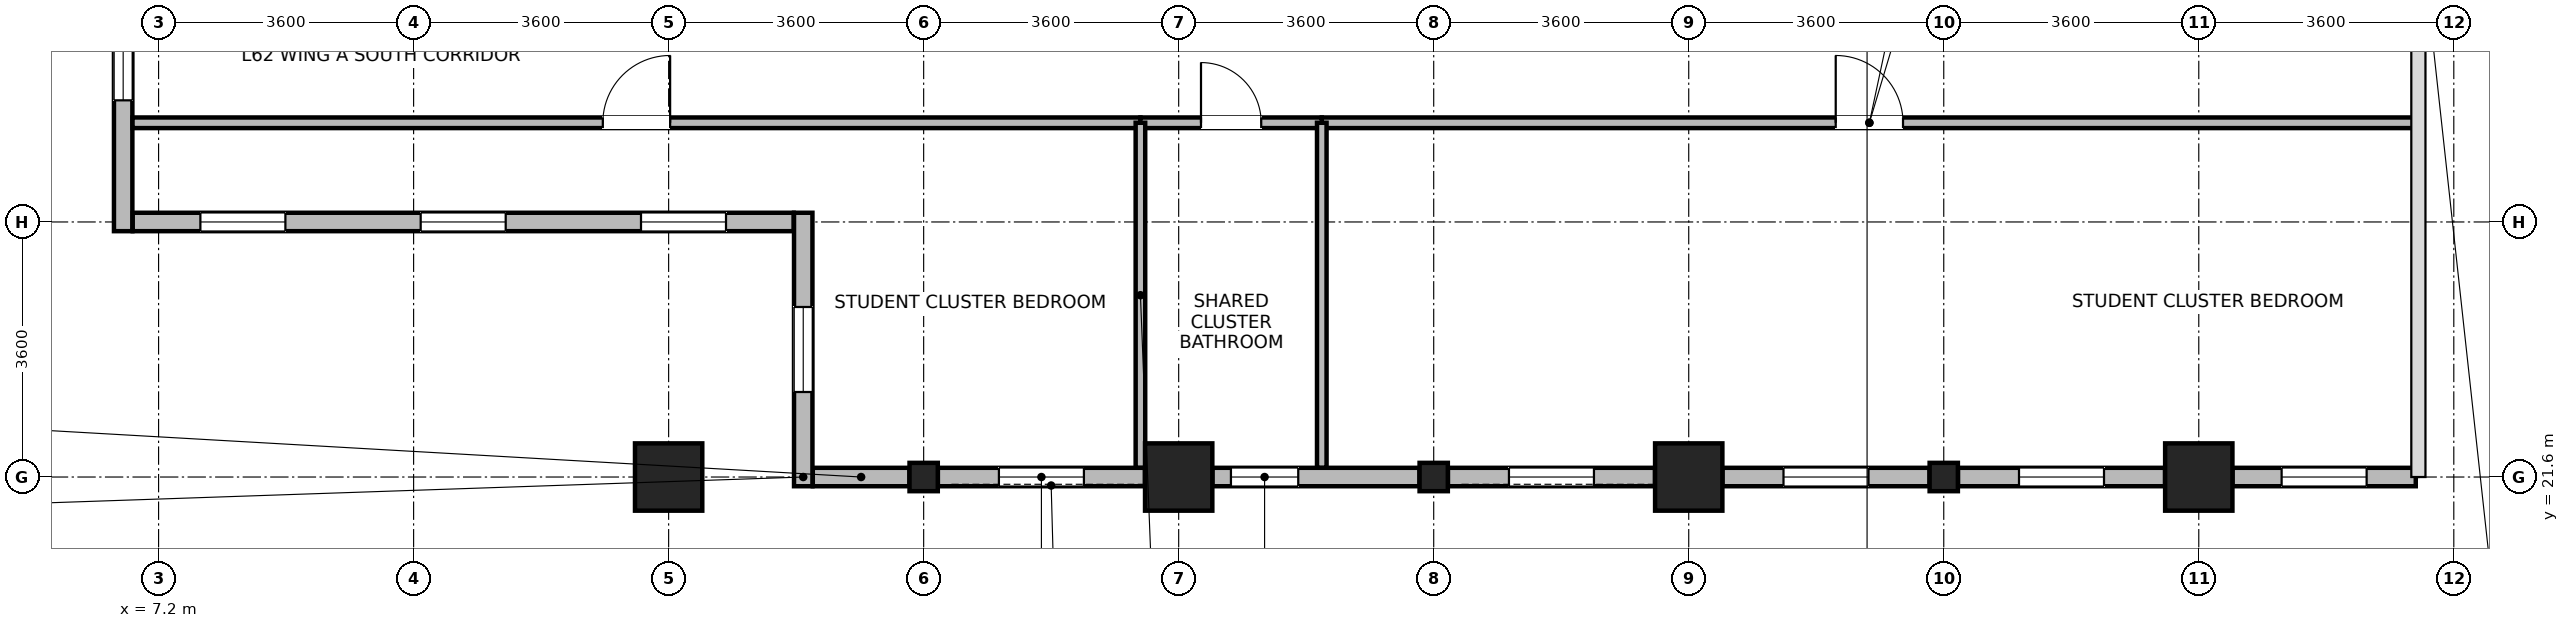
"""IFC4 building model, lengths in metres.
Left out: names, types, materials, properties, quantities, classifications, styles, units other than length and angle.
Written with IfcOpenShell. Run it as: python <this file> out.ifc"""

import sys

from ifc_helpers import new_model, si_unit, direction, frame, frame_2d, origin, origin_2d, place, context, subcontext, project, spatial, rectangle, i_section, extrude, source, transform, mapped, element, fill, save


model = new_model("IFC4")
c1 = context("Model", 3, precision=1e-05, world=origin(), true_north=direction((0.0, 1.0)))
c2 = subcontext(c1, "Body", "Model", "MODEL_VIEW")
j1 = project(units=[si_unit("LENGTHUNIT", "METRE"), si_unit("PLANEANGLEUNIT", "RADIAN")], contexts=[c1])
p1 = place(None, origin())
s1 = spatial("IfcSite", under=j1, at=p1, CompositionType="ELEMENT")
p2 = place(p1, origin())
s2 = spatial("IfcBuilding", under=s1, at=p2, CompositionType="ELEMENT")
p3 = place(p2, frame((0.0, 0.0, 242.5)))
s3 = spatial("IfcBuildingStorey", under=s2, at=p3, CompositionType="ELEMENT", Elevation=242.5)
m1 = source(origin(), c2, "Body", "SweptSolid", [
    extrude(rectangle(XDim=0.95, YDim=0.95, at=origin_2d()), origin(), (0.0, 0.0, 1.0), 3.7),
])
for number, where, z_axis, x_axis in (
    (1, (14.4, 21.6, 0.0), (0.0, 0.0, 1.0), (1.0, 0.0, 0.0)),
    (2, (21.6, 21.6, 0.0), (0.0, 0.0, 1.0), (1.0, 0.0, 0.0)),
    (3, (28.8, 21.6, 0.0), (0.0, 0.0, 1.0), (1.0, 0.0, 0.0)),
    (4, (36.0, 21.6, 0.0), (0.0, 0.0, 1.0), (1.0, 0.0, 0.0)),
):
    element("IfcColumn", number, at=place(p3, frame(where, z_axis=z_axis, x_axis=x_axis)), inside=s3, PredefinedType="COLUMN", context=c2, shape_type="MappedRepresentation", body=[
        mapped(m1, transform((0.0, 0.0, 0.0), x_axis=(1.0, 0.0, 0.0), y_axis=(0.0, 1.0, 0.0), z_axis=(0.0, 0.0, 1.0), scale=1.0)),
    ])
m2 = source(origin(), c2, "Body", "SweptSolid", [
    extrude(i_section(OverallWidth=0.399, OverallDepth=0.4, WebThickness=0.017, FlangeThickness=0.023, FilletRadius=0.015, at=origin_2d()), origin(), (0.0, 0.0, 1.0), 3.7),
])
for number, where, z_axis, x_axis in (
    (5, (18.0, 21.6, 0.0), (0.0, 0.0, 1.0), (1.0, 0.0, 0.0)),
    (6, (25.2, 21.6, 0.0), (0.0, 0.0, 1.0), (1.0, 0.0, 0.0)),
    (7, (32.4, 21.6, 0.0), (0.0, 0.0, 1.0), (1.0, 0.0, 0.0)),
):
    element("IfcColumn", number, at=place(p3, frame(where, z_axis=z_axis, x_axis=x_axis)), inside=s3, PredefinedType="COLUMN", context=c2, shape_type="MappedRepresentation", body=[
        mapped(m2, transform((0.0, 0.0, 0.0), x_axis=(1.0, 0.0, 0.0), y_axis=(0.0, 1.0, 0.0), z_axis=(0.0, 0.0, 1.0), scale=1.0)),
    ])
p4 = place(p3, frame((17.8, 21.6, 0.0), z_axis=(0.0, 0.0, 1.0), x_axis=(-1.0, 0.0, 0.0)))
e8 = element("IfcWall", 8, at=p4, inside=s3, PredefinedType="STANDARD", context=c2, shape_type="SweptSolid", body=[
    extrude(rectangle(XDim=1.365, YDim=0.26, at=frame_2d((0.682, 0.0))), origin(), (0.0, 0.0, 1.0), 3.02),
])
p5 = place(p3, frame((21.124, 21.6, 0.0), z_axis=(0.0, 0.0, 1.0), x_axis=(-1.0, 0.0, 0.0)))
e9 = element("IfcWall", 9, at=p5, inside=s3, PredefinedType="STANDARD", context=c2, shape_type="SweptSolid", body=[
    extrude(rectangle(XDim=2.924, YDim=0.26, at=frame_2d((1.462, 0.0))), origin(), (0.0, 0.0, 1.0), 3.02),
])
p6 = place(p5, frame((0.862, 0.0, 0.85)))
e10 = element("IfcOpeningElement", 10, at=p6, cuts=e9, PredefinedType="OPENING", context=c2, shape_type="SweptSolid", body=[
    extrude(rectangle(XDim=1.2, YDim=1.75, at=frame_2d((0.6, 0.875))), frame((0.0, 0.14, 0.0), z_axis=(0.0, -1.0, 0.0), x_axis=(1.0, 0.0, 0.0)), (0.0, 0.0, 1.0), 0.28),
])
p7 = place(p3, frame((25.0, 21.6, 0.0), z_axis=(0.0, 0.0, 1.0), x_axis=(-1.0, 0.0, 0.0)))
e11 = element("IfcWall", 11, at=p7, inside=s3, PredefinedType="STANDARD", context=c2, shape_type="SweptSolid", body=[
    extrude(rectangle(XDim=2.924, YDim=0.26, at=frame_2d((1.462, 0.0))), origin(), (0.0, 0.0, 1.0), 3.02),
])
p8 = place(p7, frame((1.712, 0.0, 0.85)))
e12 = element("IfcOpeningElement", 12, at=p8, cuts=e11, PredefinedType="OPENING", context=c2, shape_type="SweptSolid", body=[
    extrude(rectangle(XDim=0.95, YDim=1.75, at=frame_2d((0.475, 0.875))), frame((0.0, 0.14, 0.0), z_axis=(0.0, -1.0, 0.0), x_axis=(1.0, 0.0, 0.0)), (0.0, 0.0, 1.0), 0.28),
])
p9 = place(p3, frame((28.324, 21.6, 0.0), z_axis=(0.0, 0.0, 1.0), x_axis=(-1.0, 0.0, 0.0)))
e13 = element("IfcWall", 13, at=p9, inside=s3, PredefinedType="STANDARD", context=c2, shape_type="SweptSolid", body=[
    extrude(rectangle(XDim=2.924, YDim=0.26, at=frame_2d((1.462, 0.0))), origin(), (0.0, 0.0, 1.0), 3.02),
])
p10 = place(p9, frame((0.862, 0.0, 0.85)))
e14 = element("IfcOpeningElement", 14, at=p10, cuts=e13, PredefinedType="OPENING", context=c2, shape_type="SweptSolid", body=[
    extrude(rectangle(XDim=1.2, YDim=1.75, at=frame_2d((0.6, 0.875))), frame((0.0, 0.14, 0.0), z_axis=(0.0, -1.0, 0.0), x_axis=(1.0, 0.0, 0.0)), (0.0, 0.0, 1.0), 0.28),
])
p11 = place(p3, frame((32.199, 21.6, 0.0), z_axis=(0.0, 0.0, 1.0), x_axis=(-1.0, 0.0, 0.0)))
e15 = element("IfcWall", 15, at=p11, inside=s3, PredefinedType="STANDARD", context=c2, shape_type="SweptSolid", body=[
    extrude(rectangle(XDim=2.924, YDim=0.26, at=frame_2d((1.462, 0.0))), origin(), (0.0, 0.0, 1.0), 3.02),
])
p12 = place(p11, frame((0.862, 0.0, 0.85)))
e16 = element("IfcOpeningElement", 16, at=p12, cuts=e15, PredefinedType="OPENING", context=c2, shape_type="SweptSolid", body=[
    extrude(rectangle(XDim=1.2, YDim=1.75, at=frame_2d((0.6, 0.875))), frame((0.0, 0.14, 0.0), z_axis=(0.0, -1.0, 0.0), x_axis=(1.0, 0.0, 0.0)), (0.0, 0.0, 1.0), 0.28),
])
p13 = place(p3, frame((35.524, 21.6, 0.0), z_axis=(0.0, 0.0, 1.0), x_axis=(-1.0, 0.0, 0.0)))
e17 = element("IfcWall", 17, at=p13, inside=s3, PredefinedType="STANDARD", context=c2, shape_type="SweptSolid", body=[
    extrude(rectangle(XDim=2.923, YDim=0.26, at=frame_2d((1.462, 0.0))), origin(), (0.0, 0.0, 1.0), 3.02),
])
p14 = place(p13, frame((0.862, 0.0, 0.85)))
e18 = element("IfcOpeningElement", 18, at=p14, cuts=e17, PredefinedType="OPENING", context=c2, shape_type="SweptSolid", body=[
    extrude(rectangle(XDim=1.2, YDim=1.75, at=frame_2d((0.6, 0.875))), frame((0.0, 0.14, 0.0), z_axis=(0.0, -1.0, 0.0), x_axis=(1.0, 0.0, 0.0)), (0.0, 0.0, 1.0), 0.28),
])
p15 = place(p3, frame((39.063, 21.6, 0.0), z_axis=(0.0, 0.0, 1.0), x_axis=(-1.0, 0.0, 0.0)))
e19 = element("IfcWall", 19, at=p15, inside=s3, PredefinedType="STANDARD", context=c2, shape_type="SweptSolid", body=[
    extrude(rectangle(XDim=2.587, YDim=0.26, at=frame_2d((1.293, 0.0))), origin(), (0.0, 0.0, 1.0), 3.42),
])
p16 = place(p15, frame((0.694, 0.0, 0.85)))
e20 = element("IfcOpeningElement", 20, at=p16, cuts=e19, PredefinedType="OPENING", context=c2, shape_type="SweptSolid", body=[
    extrude(rectangle(XDim=1.2, YDim=1.75, at=frame_2d((0.6, 0.875))), frame((0.0, 0.14, 0.0), z_axis=(0.0, -1.0, 0.0), x_axis=(1.0, 0.0, 0.0)), (0.0, 0.0, 1.0), 0.28),
])
p17 = place(p3, frame((6.7, 25.07, 0.0), z_axis=(0.0, 0.0, 1.0), x_axis=(0.0, 1.0, 0.0)))
e21 = element("IfcWall", 21, at=p17, inside=s3, PredefinedType="STANDARD", context=c2, shape_type="SweptSolid", body=[
    extrude(rectangle(XDim=3.104, YDim=0.26, at=frame_2d((1.552, 0.0))), origin(), (0.0, 0.0, 1.0), 3.42),
])
p18 = place(p17, frame((1.847, 0.0, 0.85)))
e22 = element("IfcOpeningElement", 22, at=p18, cuts=e21, PredefinedType="OPENING", context=c2, shape_type="SweptSolid", body=[
    extrude(rectangle(XDim=0.95, YDim=1.75, at=frame_2d((0.475, 0.875))), frame((0.0, 0.14, 0.0), z_axis=(0.0, -1.0, 0.0), x_axis=(1.0, 0.0, 0.0)), (0.0, 0.0, 1.0), 0.28),
])
p19 = place(p3, frame((16.165, 25.2, 0.0), z_axis=(0.0, 0.0, 1.0), x_axis=(-1.0, 0.0, 0.0)))
e23 = element("IfcWall", 23, at=p19, inside=s3, PredefinedType="STANDARD", context=c2, shape_type="SweptSolid", body=[
    extrude(rectangle(XDim=9.33, YDim=0.26, at=frame_2d((4.665, 0.0))), origin(), (0.0, 0.0, 1.0), 3.42),
])
p20 = place(p19, frame((0.955, 0.0, 0.85)))
e24 = element("IfcOpeningElement", 24, at=p20, cuts=e23, PredefinedType="OPENING", context=c2, shape_type="SweptSolid", body=[
    extrude(rectangle(XDim=1.2, YDim=1.75, at=frame_2d((0.6, 0.875))), frame((0.0, 0.14, 0.0), z_axis=(0.0, -1.0, 0.0), x_axis=(1.0, 0.0, 0.0)), (0.0, 0.0, 1.0), 0.28),
])
p21 = place(p19, frame((4.065, 0.0, 0.85)))
e25 = element("IfcOpeningElement", 25, at=p21, cuts=e23, PredefinedType="OPENING", context=c2, shape_type="SweptSolid", body=[
    extrude(rectangle(XDim=1.2, YDim=1.75, at=frame_2d((0.6, 0.875))), frame((0.0, 0.14, 0.0), z_axis=(0.0, -1.0, 0.0), x_axis=(1.0, 0.0, 0.0)), (0.0, 0.0, 1.0), 0.28),
])
p22 = place(p19, frame((7.175, 0.0, 0.85)))
e26 = element("IfcOpeningElement", 26, at=p22, cuts=e23, PredefinedType="OPENING", context=c2, shape_type="SweptSolid", body=[
    extrude(rectangle(XDim=1.2, YDim=1.75, at=frame_2d((0.6, 0.875))), frame((0.0, 0.14, 0.0), z_axis=(0.0, -1.0, 0.0), x_axis=(1.0, 0.0, 0.0)), (0.0, 0.0, 1.0), 0.28),
])
p23 = place(p3, frame((16.3, 21.47, 0.0), z_axis=(0.0, 0.0, 1.0), x_axis=(0.0, 1.0, 0.0)))
e27 = element("IfcWall", 27, at=p23, inside=s3, PredefinedType="STANDARD", context=c2, shape_type="SweptSolid", body=[
    extrude(rectangle(XDim=3.86, YDim=0.26, at=frame_2d((1.93, 0.0))), origin(), (0.0, 0.0, 1.0), 3.42),
])
p24 = place(p23, frame((1.33, 0.0, 0.85)))
e28 = element("IfcOpeningElement", 28, at=p24, cuts=e27, PredefinedType="OPENING", context=c2, shape_type="SweptSolid", body=[
    extrude(rectangle(XDim=1.2, YDim=1.75, at=frame_2d((0.6, 0.875))), frame((0.0, 0.14, 0.0), z_axis=(0.0, -1.0, 0.0), x_axis=(1.0, 0.0, 0.0)), (0.0, 0.0, 1.0), 0.28),
])
p25 = place(p3, frame((23.62, 26.6, 0.0), z_axis=(0.0, 0.0, 1.0), x_axis=(1.0, 0.0, 0.0)))
e29 = element("IfcWall", 29, at=p25, inside=s3, PredefinedType="PARTITIONING", context=c2, shape_type="SweptSolid", body=[
    extrude(rectangle(XDim=15.46, YDim=0.15, at=frame_2d((7.73, 0.0))), origin(), (0.0, 0.0, 1.0), 3.42),
])
p26 = place(p25, frame((7.255, 0.0, 0.0)))
e30 = element("IfcOpeningElement", 30, at=p26, cuts=e29, PredefinedType="OPENING", context=c2, shape_type="SweptSolid", body=[
    extrude(rectangle(XDim=0.95, YDim=2.1, at=frame_2d((0.475, 1.05))), frame((0.0, 0.085, 0.0), z_axis=(0.0, -1.0, 0.0), x_axis=(1.0, 0.0, 0.0)), (0.0, 0.0, 1.0), 0.17),
])
p27 = place(p3, frame((6.832, 26.6, 0.0), z_axis=(0.0, 0.0, 1.0), x_axis=(1.0, 0.0, 0.0)))
e31 = element("IfcWall", 31, at=p27, inside=s3, PredefinedType="PARTITIONING", context=c2, shape_type="SweptSolid", body=[
    extrude(rectangle(XDim=14.228, YDim=0.15, at=frame_2d((7.114, 0.0))), origin(), (0.0, 0.0, 1.0), 3.42),
])
p28 = place(p27, frame((6.639, 0.0, 0.0)))
e32 = element("IfcOpeningElement", 32, at=p28, cuts=e31, PredefinedType="OPENING", context=c2, shape_type="SweptSolid", body=[
    extrude(rectangle(XDim=0.95, YDim=2.1, at=frame_2d((0.475, 1.05))), frame((0.0, 0.085, 0.0), z_axis=(0.0, -1.0, 0.0), x_axis=(1.0, 0.0, 0.0)), (0.0, 0.0, 1.0), 0.17),
])
p29 = place(p3, frame((21.06, 26.6, 0.0), z_axis=(0.0, 0.0, 1.0), x_axis=(1.0, 0.0, 0.0)))
e33 = element("IfcWall", 33, at=p29, inside=s3, PredefinedType="PARTITIONING", context=c2, shape_type="SweptSolid", body=[
    extrude(rectangle(XDim=2.56, YDim=0.15, at=frame_2d((1.28, 0.0))), origin(), (0.0, 0.0, 1.0), 3.42),
])
p30 = place(p29, frame((0.855, 0.0, 0.0)))
e34 = element("IfcOpeningElement", 34, at=p30, cuts=e33, PredefinedType="OPENING", context=c2, shape_type="SweptSolid", body=[
    extrude(rectangle(XDim=0.85, YDim=2.04, at=frame_2d((0.425, 1.02))), frame((0.0, 0.085, 0.0), z_axis=(0.0, -1.0, 0.0), x_axis=(1.0, 0.0, 0.0)), (0.0, 0.0, 1.0), 0.17),
])
for number, where, z_axis, x_axis in (
    (35, (21.06, 21.732, 0.0), (0.0, 0.0, 1.0), (0.0, 1.0, 0.0)),
    (36, (23.62, 21.732, 0.0), (0.0, 0.0, 1.0), (0.0, 1.0, 0.0)),
):
    element("IfcWall", number, at=place(p3, frame(where, z_axis=z_axis, x_axis=x_axis)), inside=s3, PredefinedType="PARTITIONING", context=c2, shape_type="SweptSolid", body=[
        extrude(rectangle(XDim=4.868, YDim=0.135, at=frame_2d((2.434, 0.0))), origin(), (0.0, 0.0, 1.0), 3.42),
    ])
p31 = place(p6, origin())
e37 = element("IfcWindow", 37, at=p31, inside=s3, PartitioningType="SINGLE_PANEL", PredefinedType="WINDOW", context=c2, shape_type="SweptSolid", body=[
    extrude(rectangle(XDim=1.2, YDim=1.75, at=frame_2d((0.6, 0.875))), frame((0.0, 0.03, 0.0), z_axis=(0.0, -1.0, 0.0), x_axis=(1.0, 0.0, 0.0)), (0.0, 0.0, 1.0), 0.06),
])
fill(e10, e37)
p32 = place(p8, origin())
e38 = element("IfcWindow", 38, at=p32, inside=s3, PartitioningType="SINGLE_PANEL", PredefinedType="WINDOW", context=c2, shape_type="SweptSolid", body=[
    extrude(rectangle(XDim=0.95, YDim=1.75, at=frame_2d((0.475, 0.875))), frame((0.0, 0.03, 0.0), z_axis=(0.0, -1.0, 0.0), x_axis=(1.0, 0.0, 0.0)), (0.0, 0.0, 1.0), 0.06),
])
fill(e12, e38)
p33 = place(p10, origin())
e39 = element("IfcWindow", 39, at=p33, inside=s3, PartitioningType="SINGLE_PANEL", PredefinedType="WINDOW", context=c2, shape_type="SweptSolid", body=[
    extrude(rectangle(XDim=1.2, YDim=1.75, at=frame_2d((0.6, 0.875))), frame((0.0, 0.03, 0.0), z_axis=(0.0, -1.0, 0.0), x_axis=(1.0, 0.0, 0.0)), (0.0, 0.0, 1.0), 0.06),
])
fill(e14, e39)
p34 = place(p12, origin())
e40 = element("IfcWindow", 40, at=p34, inside=s3, PartitioningType="SINGLE_PANEL", PredefinedType="WINDOW", context=c2, shape_type="SweptSolid", body=[
    extrude(rectangle(XDim=1.2, YDim=1.75, at=frame_2d((0.6, 0.875))), frame((0.0, 0.03, 0.0), z_axis=(0.0, -1.0, 0.0), x_axis=(1.0, 0.0, 0.0)), (0.0, 0.0, 1.0), 0.06),
])
fill(e16, e40)
p35 = place(p14, origin())
e41 = element("IfcWindow", 41, at=p35, inside=s3, PartitioningType="SINGLE_PANEL", PredefinedType="WINDOW", context=c2, shape_type="SweptSolid", body=[
    extrude(rectangle(XDim=1.2, YDim=1.75, at=frame_2d((0.6, 0.875))), frame((0.0, 0.03, 0.0), z_axis=(0.0, -1.0, 0.0), x_axis=(1.0, 0.0, 0.0)), (0.0, 0.0, 1.0), 0.06),
])
fill(e18, e41)
p36 = place(p16, origin())
e42 = element("IfcWindow", 42, at=p36, inside=s3, PartitioningType="SINGLE_PANEL", PredefinedType="WINDOW", context=c2, shape_type="SweptSolid", body=[
    extrude(rectangle(XDim=1.2, YDim=1.75, at=frame_2d((0.6, 0.875))), frame((0.0, 0.03, 0.0), z_axis=(0.0, -1.0, 0.0), x_axis=(1.0, 0.0, 0.0)), (0.0, 0.0, 1.0), 0.06),
])
fill(e20, e42)
p37 = place(p18, origin())
e43 = element("IfcWindow", 43, at=p37, inside=s3, PartitioningType="SINGLE_PANEL", PredefinedType="WINDOW", context=c2, shape_type="SweptSolid", body=[
    extrude(rectangle(XDim=0.95, YDim=1.75, at=frame_2d((0.475, 0.875))), frame((0.0, 0.03, 0.0), z_axis=(0.0, -1.0, 0.0), x_axis=(1.0, 0.0, 0.0)), (0.0, 0.0, 1.0), 0.06),
])
fill(e22, e43)
p38 = place(p20, origin())
e44 = element("IfcWindow", 44, at=p38, inside=s3, PartitioningType="SINGLE_PANEL", PredefinedType="WINDOW", context=c2, shape_type="SweptSolid", body=[
    extrude(rectangle(XDim=1.2, YDim=1.75, at=frame_2d((0.6, 0.875))), frame((0.0, 0.03, 0.0), z_axis=(0.0, -1.0, 0.0), x_axis=(1.0, 0.0, 0.0)), (0.0, 0.0, 1.0), 0.06),
])
fill(e24, e44)
p39 = place(p21, origin())
e45 = element("IfcWindow", 45, at=p39, inside=s3, PartitioningType="SINGLE_PANEL", PredefinedType="WINDOW", context=c2, shape_type="SweptSolid", body=[
    extrude(rectangle(XDim=1.2, YDim=1.75, at=frame_2d((0.6, 0.875))), frame((0.0, 0.03, 0.0), z_axis=(0.0, -1.0, 0.0), x_axis=(1.0, 0.0, 0.0)), (0.0, 0.0, 1.0), 0.06),
])
fill(e25, e45)
p40 = place(p22, origin())
e46 = element("IfcWindow", 46, at=p40, inside=s3, PartitioningType="SINGLE_PANEL", PredefinedType="WINDOW", context=c2, shape_type="SweptSolid", body=[
    extrude(rectangle(XDim=1.2, YDim=1.75, at=frame_2d((0.6, 0.875))), frame((0.0, 0.03, 0.0), z_axis=(0.0, -1.0, 0.0), x_axis=(1.0, 0.0, 0.0)), (0.0, 0.0, 1.0), 0.06),
])
fill(e26, e46)
p41 = place(p24, origin())
e47 = element("IfcWindow", 47, at=p41, inside=s3, PartitioningType="SINGLE_PANEL", PredefinedType="WINDOW", context=c2, shape_type="SweptSolid", body=[
    extrude(rectangle(XDim=1.2, YDim=1.75, at=frame_2d((0.6, 0.875))), frame((0.0, 0.03, 0.0), z_axis=(0.0, -1.0, 0.0), x_axis=(1.0, 0.0, 0.0)), (0.0, 0.0, 1.0), 0.06),
])
fill(e28, e47)
p42 = place(p26, origin())
e48 = element("IfcDoor", 48, at=p42, inside=s3, OperationType="SINGLE_SWING_LEFT", PredefinedType="DOOR", context=c2, shape_type="SweptSolid", body=[
    extrude(rectangle(XDim=0.95, YDim=2.1, at=frame_2d((0.475, 1.05))), frame((0.0, 0.025, 0.0), z_axis=(0.0, -1.0, 0.0), x_axis=(1.0, 0.0, 0.0)), (0.0, 0.0, 1.0), 0.05),
])
fill(e30, e48)
p43 = place(p28, origin())
e49 = element("IfcDoor", 49, at=p43, inside=s3, OperationType="SINGLE_SWING_RIGHT", PredefinedType="DOOR", context=c2, shape_type="SweptSolid", body=[
    extrude(rectangle(XDim=0.95, YDim=2.1, at=frame_2d((0.475, 1.05))), frame((0.0, 0.025, 0.0), z_axis=(0.0, -1.0, 0.0), x_axis=(1.0, 0.0, 0.0)), (0.0, 0.0, 1.0), 0.05),
])
fill(e32, e49)
p44 = place(p30, origin())
e50 = element("IfcDoor", 50, at=p44, inside=s3, OperationType="SINGLE_SWING_LEFT", PredefinedType="DOOR", context=c2, shape_type="SweptSolid", body=[
    extrude(rectangle(XDim=0.85, YDim=2.04, at=frame_2d((0.425, 1.02))), frame((0.0, 0.025, 0.0), z_axis=(0.0, -1.0, 0.0), x_axis=(1.0, 0.0, 0.0)), (0.0, 0.0, 1.0), 0.05),
])
fill(e34, e50)
save(model, sys.argv[1])
